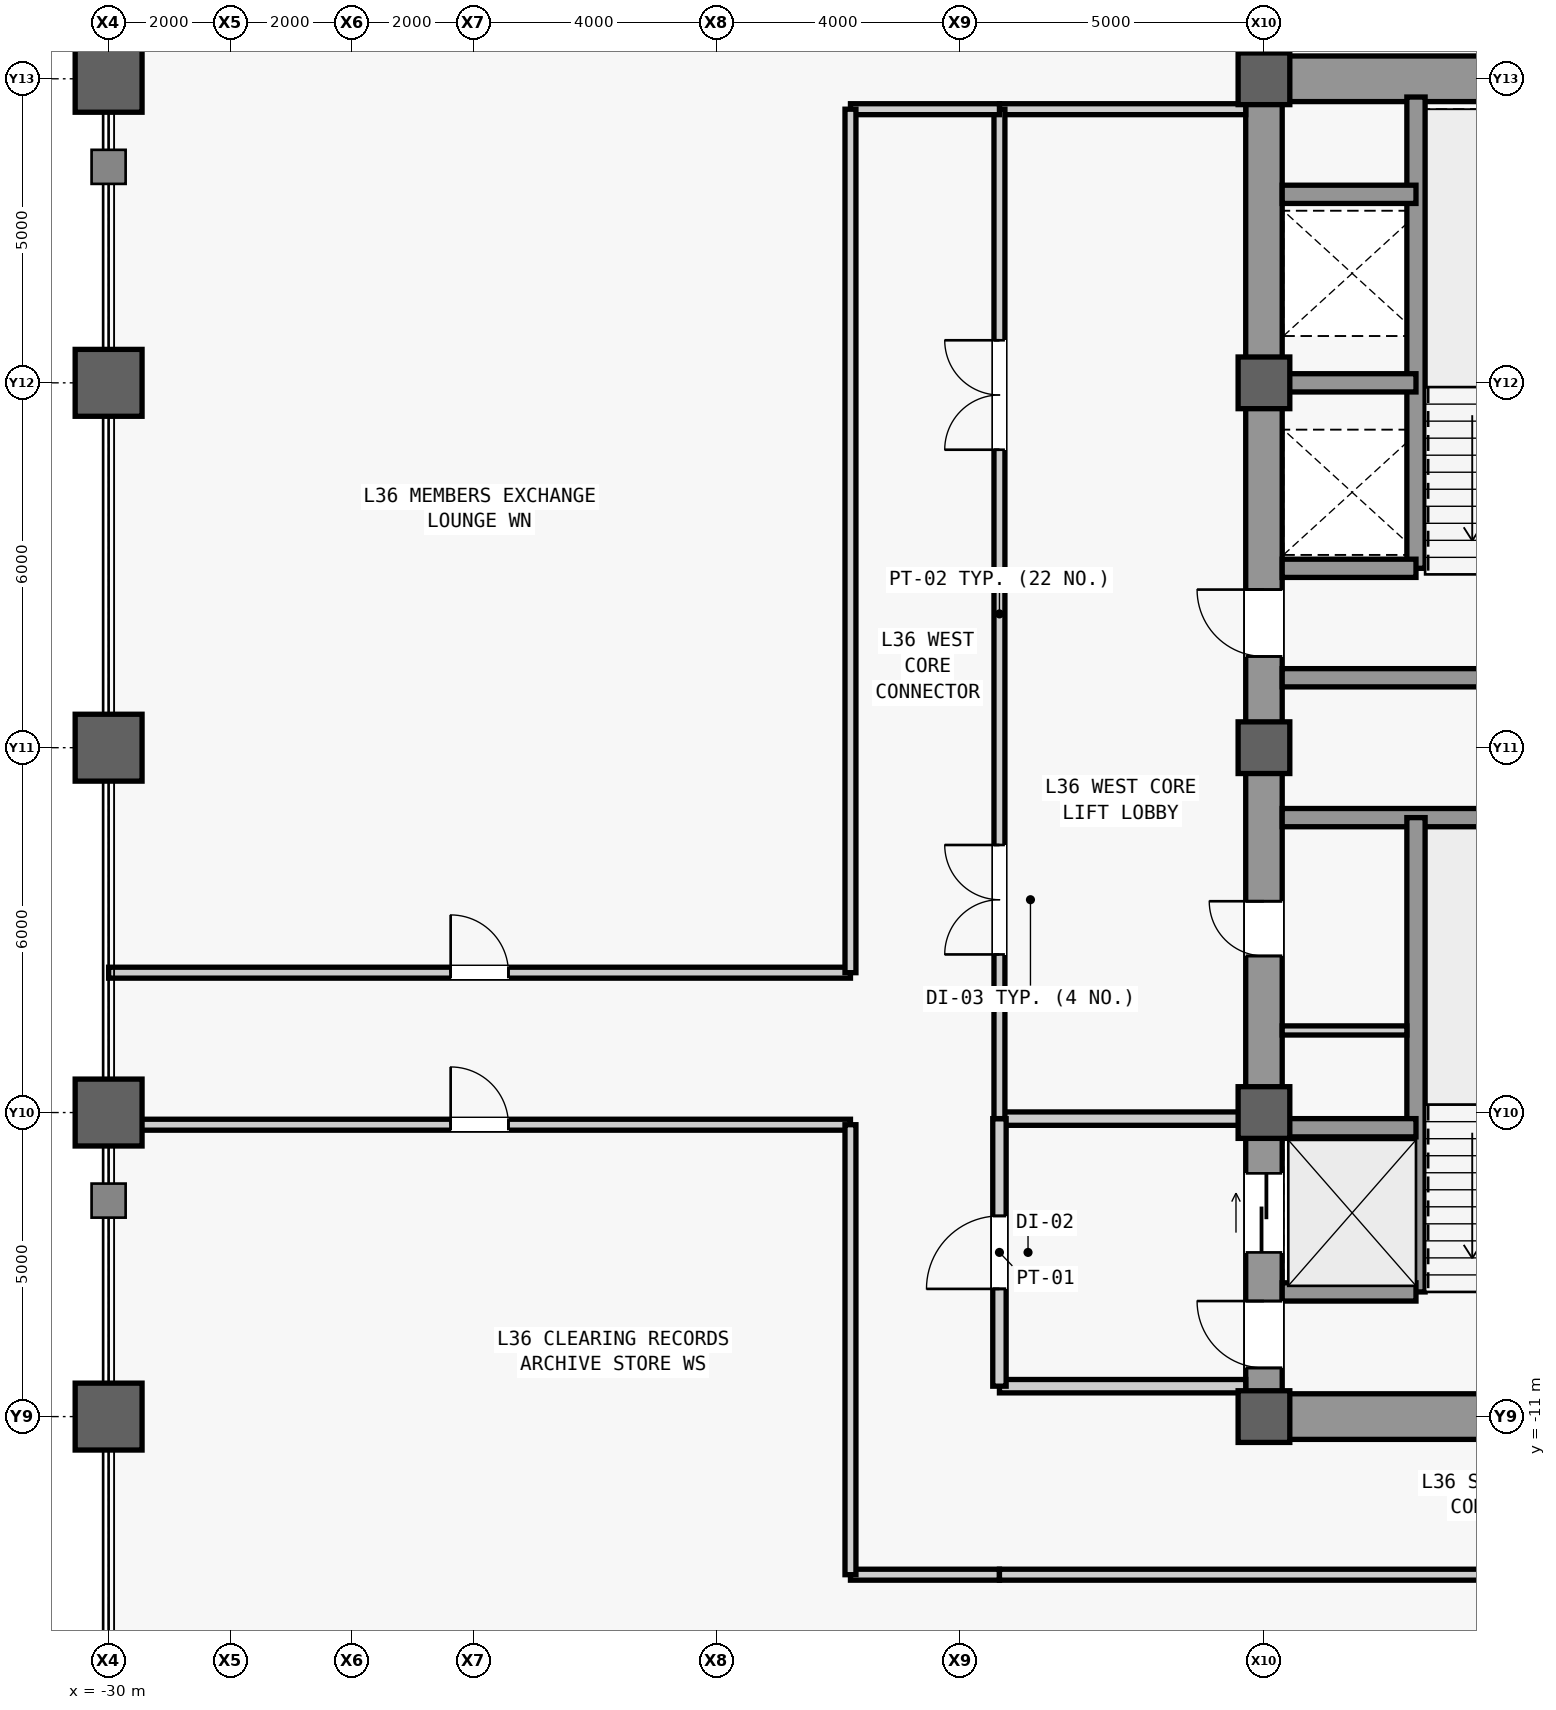
"""IFC4 building model, lengths in metres.
Left out: names, types, materials, properties, quantities, classifications, styles, units other than length and angle.
Written with IfcOpenShell. Run it as: python <this file> out.ifc"""

import sys

from ifc_helpers import new_model, si_unit, direction, frame, frame_2d, origin, origin_2d, place, context, subcontext, project, spatial, rectangle, hollow_rectangle, extrude, source, transform, mapped, element, fill, save


model = new_model("IFC4")
c1 = context("Model", 3, precision=1e-05, world=origin(), true_north=direction((0.0, 1.0)))
c2 = subcontext(c1, "Body", "Model", "MODEL_VIEW")
j1 = project(units=[si_unit("LENGTHUNIT", "METRE"), si_unit("PLANEANGLEUNIT", "RADIAN")], contexts=[c1])
p1 = place(None, origin())
s1 = spatial("IfcSite", under=j1, at=p1, CompositionType="ELEMENT")
p2 = place(p1, origin())
s2 = spatial("IfcBuilding", under=s1, at=p2, CompositionType="ELEMENT")
p3 = place(p2, frame((0.0, 0.0, 159.1)))
s3 = spatial("IfcBuildingStorey", under=s2, at=p3, CompositionType="ELEMENT", Elevation=159.1)
m1 = source(origin(), c2, "Body", "SweptSolid", [
    extrude(rectangle(XDim=22.0, YDim=0.6, at=frame_2d((11.0, 0.0))), origin(), (0.0, 0.0, 1.0), 3.78),
])
p4 = place(p3, frame((-11.0, -11.0, 0.0), z_axis=(0.0, 0.0, 1.0), x_axis=(0.0, 1.0, 0.0)))
e1 = element("IfcWall", 1, at=p4, inside=s3, PredefinedType="SHEAR", context=c2, shape_type="MappedRepresentation", body=[
    mapped(m1, transform((0.0, 0.0, 0.0), scale=1.0)),
])
m2 = source(origin(), c2, "Body", "SweptSolid", [
    extrude(rectangle(XDim=1.1, YDim=2.2, at=frame_2d((0.55, 1.1))), frame((0.0, 0.31, 0.0), z_axis=(0.0, -1.0, 0.0), x_axis=(1.0, 0.0, 0.0)), (0.0, 0.0, 1.0), 0.62),
])
p5 = place(p4, frame((0.8, 0.0, 0.0)))
e2 = element("IfcOpeningElement", 2, at=p5, cuts=e1, PredefinedType="OPENING", context=c2, shape_type="MappedRepresentation", body=[
    mapped(m2, transform((0.0, 0.0, 0.0), scale=1.0)),
])
p6 = place(p4, frame((12.5, 0.0, 0.0)))
e3 = element("IfcOpeningElement", 3, at=p6, cuts=e1, PredefinedType="OPENING", context=c2, shape_type="MappedRepresentation", body=[
    mapped(m2, transform((0.0, 0.0, 0.0), scale=1.0)),
])
m3 = source(origin(), c2, "Body", "SweptSolid", [
    extrude(rectangle(XDim=0.9, YDim=2.15, at=frame_2d((0.45, 1.075))), frame((0.0, 0.31, 0.0), z_axis=(0.0, -1.0, 0.0), x_axis=(1.0, 0.0, 0.0)), (0.0, 0.0, 1.0), 0.62),
])
p7 = place(p4, frame((7.575, 0.0, 0.0)))
e4 = element("IfcOpeningElement", 4, at=p7, cuts=e1, PredefinedType="OPENING", context=c2, shape_type="MappedRepresentation", body=[
    mapped(m3, transform((0.0, 0.0, 0.0), scale=1.0)),
])
m4 = source(origin(), c2, "Body", "SweptSolid", [
    extrude(rectangle(XDim=1.3, YDim=2.3, at=frame_2d((0.65, 1.15))), frame((0.0, 0.31, 0.0), z_axis=(0.0, -1.0, 0.0), x_axis=(1.0, 0.0, 0.0)), (0.0, 0.0, 1.0), 0.62),
])
p8 = place(p4, frame((2.7, 0.0, 0.0)))
e5 = element("IfcOpeningElement", 5, at=p8, cuts=e1, PredefinedType="OPENING", context=c2, shape_type="MappedRepresentation", body=[
    mapped(m4, transform((0.0, 0.0, 0.0), scale=1.0)),
])
m5 = source(origin(), c2, "Body", "SweptSolid", [
    extrude(rectangle(XDim=5.85, YDim=0.75, at=frame_2d((2.925, 0.0))), origin(), (0.0, 0.0, 1.0), 3.78),
])
for number, where, z_axis, x_axis in (
    (6, (-10.7, -11.0, 0.0), (0.0, 0.0, 1.0), (1.0, 0.0, 0.0)),
    (7, (-10.7, 11.0, 0.0), (0.0, 0.0, 1.0), (1.0, 0.0, 0.0)),
):
    element("IfcWall", number, at=place(p3, frame(where, z_axis=z_axis, x_axis=x_axis)), inside=s3, PredefinedType="SHEAR", context=c2, shape_type="MappedRepresentation", body=[
        mapped(m5, transform((0.0, 0.0, 0.0), scale=1.0)),
    ])
m6 = source(origin(), c2, "Body", "SweptSolid", [
    extrude(rectangle(XDim=5.6, YDim=0.3, at=frame_2d((2.8, 0.0))), origin(), (0.0, 0.0, 1.0), 3.78),
])
for number, where, z_axis, x_axis in (
    (8, (-10.7, -1.15, 0.0), (0.0, 0.0, 1.0), (1.0, 0.0, 0.0)),
    (9, (-10.7, 1.15, 0.0), (0.0, 0.0, 1.0), (1.0, 0.0, 0.0)),
):
    element("IfcWall", number, at=place(p3, frame(where, z_axis=z_axis, x_axis=x_axis)), inside=s3, PredefinedType="SHEAR", context=c2, shape_type="MappedRepresentation", body=[
        mapped(m6, transform((0.0, 0.0, 0.0), scale=1.0)),
    ])
m7 = source(origin(), c2, "Body", "SweptSolid", [
    extrude(hollow_rectangle(XDim=1.1, YDim=1.1, WallThickness=0.06, at=origin_2d()), origin(), (0.0, 0.0, 1.0), 4.0),
])
for number, where, z_axis, x_axis in (
    (10, (-30.0, -11.0, 0.0), (0.0, 0.0, 1.0), (1.0, 0.0, 0.0)),
    (11, (-30.0, -6.0, 0.0), (0.0, 0.0, 1.0), (1.0, 0.0, 0.0)),
    (12, (-30.0, 0.0, 0.0), (0.0, 0.0, 1.0), (1.0, 0.0, 0.0)),
    (13, (-30.0, 6.0, 0.0), (0.0, 0.0, 1.0), (1.0, 0.0, 0.0)),
    (14, (-30.0, 11.0, 0.0), (0.0, 0.0, 1.0), (1.0, 0.0, 0.0)),
):
    element("IfcColumn", number, at=place(p3, frame(where, z_axis=z_axis, x_axis=x_axis)), inside=s3, PredefinedType="COLUMN", context=c2, shape_type="MappedRepresentation", body=[
        mapped(m7, transform((0.0, 0.0, 0.0), scale=1.0)),
    ])
m8 = source(origin(), c2, "Body", "SweptSolid", [
    extrude(rectangle(XDim=0.85, YDim=0.85, at=origin_2d()), origin(), (0.0, 0.0, 1.0), 4.0),
])
for number, where, z_axis, x_axis in (
    (15, (-11.0, -11.0, 0.0), (0.0, 0.0, 1.0), (1.0, 0.0, 0.0)),
    (16, (-11.0, -6.0, 0.0), (0.0, 0.0, 1.0), (1.0, 0.0, 0.0)),
    (17, (-11.0, 0.0, 0.0), (0.0, 0.0, 1.0), (1.0, 0.0, 0.0)),
    (18, (-11.0, 6.0, 0.0), (0.0, 0.0, 1.0), (1.0, 0.0, 0.0)),
    (19, (-11.0, 11.0, 0.0), (0.0, 0.0, 1.0), (1.0, 0.0, 0.0)),
):
    element("IfcColumn", number, at=place(p3, frame(where, z_axis=z_axis, x_axis=x_axis)), inside=s3, PredefinedType="COLUMN", context=c2, shape_type="MappedRepresentation", body=[
        mapped(m8, transform((0.0, 0.0, 0.0), scale=1.0)),
    ])
m9 = source(origin(), c2, "Body", "SweptSolid", [
    extrude(rectangle(XDim=7.8, YDim=0.3, at=frame_2d((3.9, 0.0))), origin(), (0.0, 0.0, 1.0), 3.78),
])
p9 = place(p3, frame((-8.5, -8.95, 0.0), z_axis=(0.0, 0.0, 1.0), x_axis=(0.0, 1.0, 0.0)))
e20 = element("IfcWall", 20, at=p9, inside=s3, PredefinedType="SHEAR", context=c2, shape_type="MappedRepresentation", body=[
    mapped(m9, transform((0.0, 0.0, 0.0), scale=1.0)),
])
m10 = source(origin(), c2, "Body", "SweptSolid", [
    extrude(rectangle(XDim=2.2, YDim=0.3, at=frame_2d((1.1, 0.0))), origin(), (0.0, 0.0, 1.0), 3.78),
])
for number, where, z_axis, x_axis in (
    (21, (-10.7, -8.95, 0.0), (0.0, 0.0, 1.0), (1.0, 0.0, 0.0)),
    (22, (-10.7, -6.25, 0.0), (0.0, 0.0, 1.0), (1.0, 0.0, 0.0)),
):
    element("IfcWall", number, at=place(p3, frame(where, z_axis=z_axis, x_axis=x_axis)), inside=s3, PredefinedType="SHEAR", context=c2, shape_type="MappedRepresentation", body=[
        mapped(m10, transform((0.0, 0.0, 0.0), scale=1.0)),
    ])
m11 = source(origin(), c2, "Body", "SweptSolid", [
    extrude(rectangle(XDim=7.75, YDim=0.3, at=frame_2d((3.875, 0.0))), origin(), (0.0, 0.0, 1.0), 3.78),
])
p10 = place(p3, frame((-8.5, 2.95, 0.0), z_axis=(0.0, 0.0, 1.0), x_axis=(0.0, 1.0, 0.0)))
e23 = element("IfcWall", 23, at=p10, inside=s3, PredefinedType="SHEAR", context=c2, shape_type="MappedRepresentation", body=[
    mapped(m11, transform((0.0, 0.0, 0.0), scale=1.0)),
])
for number, where, z_axis, x_axis in (
    (24, (-10.7, 2.95, 0.0), (0.0, 0.0, 1.0), (1.0, 0.0, 0.0)),
    (25, (-10.7, 6.0, 0.0), (0.0, 0.0, 1.0), (1.0, 0.0, 0.0)),
    (26, (-10.7, 9.1, 0.0), (0.0, 0.0, 1.0), (1.0, 0.0, 0.0)),
):
    element("IfcWall", number, at=place(p3, frame(where, z_axis=z_axis, x_axis=x_axis)), inside=s3, PredefinedType="SHEAR", context=c2, shape_type="MappedRepresentation", body=[
        mapped(m10, transform((0.0, 0.0, 0.0), scale=1.0)),
    ])
m12 = source(origin(), c2, "Body", "SweptSolid", [
    extrude(rectangle(XDim=2.05, YDim=0.15, at=frame_2d((1.025, 0.0))), origin(), (0.0, 0.0, 1.0), 3.78),
])
p11 = place(p3, frame((-10.7, -4.65, 0.0), z_axis=(0.0, 0.0, 1.0), x_axis=(1.0, 0.0, 0.0)))
e27 = element("IfcWall", 27, at=p11, inside=s3, PredefinedType="PARTITIONING", context=c2, shape_type="MappedRepresentation", body=[
    mapped(m12, transform((0.0, 0.0, 0.0), scale=1.0)),
])
m13 = source(origin(), c2, "Body", "SweptSolid", [
    extrude(rectangle(XDim=4.05, YDim=0.22, at=frame_2d((2.025, 0.0))), origin(), (0.0, 0.0, 1.0), 3.78),
])
p12 = place(p3, frame((-15.35, -10.5, 0.0), z_axis=(0.0, 0.0, 1.0), x_axis=(1.0, 0.0, 0.0)))
e28 = element("IfcWall", 28, at=p12, inside=s3, PredefinedType="PARTITIONING", context=c2, shape_type="MappedRepresentation", body=[
    mapped(m13, transform((0.0, 0.0, 0.0), scale=1.0)),
])
m14 = source(origin(), c2, "Body", "SweptSolid", [
    extrude(rectangle(XDim=4.05, YDim=0.22, at=frame_2d((2.025, 0.0))), origin(), (0.0, 0.0, 1.0), 3.007),
])
p13 = place(p3, frame((-15.35, -6.1, 0.0), z_axis=(0.0, 0.0, 1.0), x_axis=(1.0, 0.0, 0.0)))
e29 = element("IfcWall", 29, at=p13, inside=s3, PredefinedType="PARTITIONING", context=c2, shape_type="MappedRepresentation", body=[
    mapped(m14, transform((0.0, 0.0, 0.0), scale=1.0)),
])
m15 = source(origin(), c2, "Body", "SweptSolid", [
    extrude(rectangle(XDim=4.4, YDim=0.22, at=frame_2d((2.2, 0.0))), origin(), (0.0, 0.0, 1.0), 3.78),
])
p14 = place(p3, frame((-15.35, -10.5, 0.0), z_axis=(0.0, 0.0, 1.0), x_axis=(0.0, 1.0, 0.0)))
e30 = element("IfcWall", 30, at=p14, inside=s3, PredefinedType="PARTITIONING", context=c2, shape_type="MappedRepresentation", body=[
    mapped(m15, transform((0.0, 0.0, 0.0), scale=1.0)),
])
m16 = source(origin(), c2, "Body", "SweptSolid", [
    extrude(rectangle(XDim=1.2, YDim=2.2, at=frame_2d((0.6, 1.1))), frame((0.0, 0.12, 0.0), z_axis=(0.0, -1.0, 0.0), x_axis=(1.0, 0.0, 0.0)), (0.0, 0.0, 1.0), 0.24),
])
p15 = place(p14, frame((1.6, 0.0, 0.0)))
e31 = element("IfcOpeningElement", 31, at=p15, cuts=e30, PredefinedType="OPENING", context=c2, shape_type="MappedRepresentation", body=[
    mapped(m16, transform((0.0, 0.0, 0.0), scale=1.0)),
])
m17 = source(origin(), c2, "Body", "SweptSolid", [
    extrude(rectangle(XDim=4.05, YDim=0.18, at=frame_2d((2.025, 0.0))), origin(), (0.0, 0.0, 1.0), 3.78),
])
p16 = place(p3, frame((-15.35, 10.5, 0.0), z_axis=(0.0, 0.0, 1.0), x_axis=(1.0, 0.0, 0.0)))
e32 = element("IfcWall", 32, at=p16, inside=s3, PredefinedType="PARTITIONING", context=c2, shape_type="MappedRepresentation", body=[
    mapped(m17, transform((0.0, 0.0, 0.0), scale=1.0)),
])
m18 = source(origin(), c2, "Body", "SweptSolid", [
    extrude(rectangle(XDim=16.6, YDim=0.18, at=frame_2d((8.3, 0.0))), origin(), (0.0, 0.0, 1.0), 3.78),
])
p17 = place(p3, frame((-15.35, -6.1, 0.0), z_axis=(0.0, 0.0, 1.0), x_axis=(0.0, 1.0, 0.0)))
e33 = element("IfcWall", 33, at=p17, inside=s3, PredefinedType="PARTITIONING", context=c2, shape_type="MappedRepresentation", body=[
    mapped(m18, transform((0.0, 0.0, 0.0), scale=1.0)),
])
m19 = source(origin(), c2, "Body", "SweptSolid", [
    extrude(rectangle(XDim=1.8, YDim=2.25, at=frame_2d((0.9, 1.125))), frame((0.0, 0.1, 0.0), z_axis=(0.0, -1.0, 0.0), x_axis=(1.0, 0.0, 0.0)), (0.0, 0.0, 1.0), 0.2),
])
p18 = place(p17, frame((2.7, 0.0, 0.0)))
e34 = element("IfcOpeningElement", 34, at=p18, cuts=e33, PredefinedType="OPENING", context=c2, shape_type="MappedRepresentation", body=[
    mapped(m19, transform((0.0, 0.0, 0.0), scale=1.0)),
])
p19 = place(p17, frame((11.0, 0.0, 0.0)))
e35 = element("IfcOpeningElement", 35, at=p19, cuts=e33, PredefinedType="OPENING", context=c2, shape_type="MappedRepresentation", body=[
    mapped(m19, transform((0.0, 0.0, 0.0), scale=1.0)),
])
m20 = source(origin(), c2, "Body", "SweptSolid", [
    extrude(rectangle(XDim=2.45, YDim=0.18, at=frame_2d((1.225, 0.0))), origin(), (0.0, 0.0, 1.0), 3.78),
])
for number, where, z_axis, x_axis in (
    (36, (-17.8, 10.5, 0.0), (0.0, 0.0, 1.0), (1.0, 0.0, 0.0)),
    (37, (-17.8, -13.6, 0.0), (0.0, 0.0, 1.0), (1.0, 0.0, 0.0)),
):
    element("IfcWall", number, at=place(p3, frame(where, z_axis=z_axis, x_axis=x_axis)), inside=s3, PredefinedType="PARTITIONING", context=c2, shape_type="MappedRepresentation", body=[
        mapped(m20, transform((0.0, 0.0, 0.0), scale=1.0)),
    ])
m21 = source(origin(), c2, "Body", "SweptSolid", [
    extrude(rectangle(XDim=9.55, YDim=0.18, at=frame_2d((4.775, 0.0))), origin(), (0.0, 0.0, 1.0), 3.78),
])
p20 = place(p3, frame((-15.35, -13.6, 0.0), z_axis=(0.0, 0.0, 1.0), x_axis=(1.0, 0.0, 0.0)))
e38 = element("IfcWall", 38, at=p20, inside=s3, PredefinedType="PARTITIONING", context=c2, shape_type="MappedRepresentation", body=[
    mapped(m21, transform((0.0, 0.0, 0.0), scale=1.0)),
])
m22 = source(origin(), c2, "Body", "SweptSolid", [
    extrude(rectangle(XDim=12.2, YDim=0.18, at=frame_2d((6.1, 0.0))), origin(), (0.0, 0.0, 1.0), 3.007),
])
p21 = place(p3, frame((-30.0, -6.2, 0.0), z_axis=(0.0, 0.0, 1.0), x_axis=(1.0, 0.0, 0.0)))
e39 = element("IfcWall", 39, at=p21, inside=s3, PredefinedType="PARTITIONING", context=c2, shape_type="MappedRepresentation", body=[
    mapped(m22, transform((0.0, 0.0, 0.0), scale=1.0)),
])
m23 = source(origin(), c2, "Body", "SweptSolid", [
    extrude(rectangle(XDim=0.95, YDim=2.15, at=frame_2d((0.475, 1.075))), frame((0.0, 0.1, 0.0), z_axis=(0.0, -1.0, 0.0), x_axis=(1.0, 0.0, 0.0)), (0.0, 0.0, 1.0), 0.2),
])
p22 = place(p21, frame((5.625, 0.0, 0.0)))
e40 = element("IfcOpeningElement", 40, at=p22, cuts=e39, PredefinedType="OPENING", context=c2, shape_type="MappedRepresentation", body=[
    mapped(m23, transform((0.0, 0.0, 0.0), scale=1.0)),
])
m24 = source(origin(), c2, "Body", "SweptSolid", [
    extrude(rectangle(XDim=7.4, YDim=0.18, at=frame_2d((3.7, 0.0))), origin(), (0.0, 0.0, 1.0), 3.78),
])
p23 = place(p3, frame((-17.8, -13.6, 0.0), z_axis=(0.0, 0.0, 1.0), x_axis=(0.0, 1.0, 0.0)))
e41 = element("IfcWall", 41, at=p23, inside=s3, PredefinedType="PARTITIONING", context=c2, shape_type="MappedRepresentation", body=[
    mapped(m24, transform((0.0, 0.0, 0.0), scale=1.0)),
])
m25 = source(origin(), c2, "Body", "SweptSolid", [
    extrude(rectangle(XDim=12.2, YDim=0.18, at=frame_2d((6.1, 0.0))), origin(), (0.0, 0.0, 1.0), 3.78),
])
p24 = place(p3, frame((-30.0, -3.7, 0.0), z_axis=(0.0, 0.0, 1.0), x_axis=(1.0, 0.0, 0.0)))
e42 = element("IfcWall", 42, at=p24, inside=s3, PredefinedType="PARTITIONING", context=c2, shape_type="MappedRepresentation", body=[
    mapped(m25, transform((0.0, 0.0, 0.0), scale=1.0)),
])
p25 = place(p24, frame((5.625, 0.0, 0.0)))
e43 = element("IfcOpeningElement", 43, at=p25, cuts=e42, PredefinedType="OPENING", context=c2, shape_type="MappedRepresentation", body=[
    mapped(m23, transform((0.0, 0.0, 0.0), scale=1.0)),
])
m26 = source(origin(), c2, "Body", "SweptSolid", [
    extrude(rectangle(XDim=14.2, YDim=0.18, at=frame_2d((7.1, 0.0))), origin(), (0.0, 0.0, 1.0), 3.78),
])
p26 = place(p3, frame((-17.8, -3.7, 0.0), z_axis=(0.0, 0.0, 1.0), x_axis=(0.0, 1.0, 0.0)))
e44 = element("IfcWall", 44, at=p26, inside=s3, PredefinedType="PARTITIONING", context=c2, shape_type="MappedRepresentation", body=[
    mapped(m26, transform((0.0, 0.0, 0.0), scale=1.0)),
])
m27 = source(origin(), c2, "Body", "SweptSolid", [
    extrude(rectangle(XDim=1.1, YDim=2.2, at=frame_2d((0.55, 1.1))), frame((0.0, 0.025, 0.0), z_axis=(0.0, -1.0, 0.0), x_axis=(1.0, 0.0, 0.0)), (0.0, 0.0, 1.0), 0.05),
])
p27 = place(p5, origin())
e45 = element("IfcDoor", 45, at=p27, inside=s3, OperationType="SINGLE_SWING_RIGHT", PredefinedType="DOOR", context=c2, shape_type="MappedRepresentation", body=[
    mapped(m27, transform((0.0, 0.0, 0.0), scale=1.0)),
])
fill(e2, e45)
p28 = place(p6, origin())
e46 = element("IfcDoor", 46, at=p28, inside=s3, OperationType="SINGLE_SWING_RIGHT", PredefinedType="DOOR", context=c2, shape_type="MappedRepresentation", body=[
    mapped(m27, transform((0.0, 0.0, 0.0), scale=1.0)),
])
fill(e3, e46)
m28 = source(origin(), c2, "Body", "SweptSolid", [
    extrude(rectangle(XDim=0.9, YDim=2.15, at=frame_2d((0.45, 1.075))), frame((0.0, 0.025, 0.0), z_axis=(0.0, -1.0, 0.0), x_axis=(1.0, 0.0, 0.0)), (0.0, 0.0, 1.0), 0.05),
])
p29 = place(p7, origin())
e47 = element("IfcDoor", 47, at=p29, inside=s3, OperationType="SINGLE_SWING_RIGHT", PredefinedType="DOOR", context=c2, shape_type="MappedRepresentation", body=[
    mapped(m28, transform((0.0, 0.0, 0.0), scale=1.0)),
])
fill(e4, e47)
m29 = source(origin(), c2, "Body", "SweptSolid", [
    extrude(rectangle(XDim=1.2, YDim=2.2, at=frame_2d((0.6, 1.1))), frame((0.0, 0.025, 0.0), z_axis=(0.0, -1.0, 0.0), x_axis=(1.0, 0.0, 0.0)), (0.0, 0.0, 1.0), 0.05),
])
p30 = place(p15, origin())
e48 = element("IfcDoor", 48, at=p30, inside=s3, OperationType="SINGLE_SWING_LEFT", PredefinedType="DOOR", context=c2, shape_type="MappedRepresentation", body=[
    mapped(m29, transform((0.0, 0.0, 0.0), scale=1.0)),
])
fill(e31, e48)
m30 = source(origin(), c2, "Body", "SweptSolid", [
    extrude(rectangle(XDim=1.8, YDim=2.25, at=frame_2d((0.9, 1.125))), frame((0.0, 0.025, 0.0), z_axis=(0.0, -1.0, 0.0), x_axis=(1.0, 0.0, 0.0)), (0.0, 0.0, 1.0), 0.05),
])
p31 = place(p18, origin())
e49 = element("IfcDoor", 49, at=p31, inside=s3, OperationType="SINGLE_SWING_LEFT", PredefinedType="DOOR", context=c2, shape_type="MappedRepresentation", body=[
    mapped(m30, transform((0.0, 0.0, 0.0), scale=1.0)),
])
fill(e34, e49)
p32 = place(p19, origin())
e50 = element("IfcDoor", 50, at=p32, inside=s3, OperationType="SINGLE_SWING_RIGHT", PredefinedType="DOOR", context=c2, shape_type="MappedRepresentation", body=[
    mapped(m30, transform((0.0, 0.0, 0.0), scale=1.0)),
])
fill(e35, e50)
m31 = source(origin(), c2, "Body", "SweptSolid", [
    extrude(rectangle(XDim=0.95, YDim=2.15, at=frame_2d((0.475, 1.075))), frame((0.0, 0.025, 0.0), z_axis=(0.0, -1.0, 0.0), x_axis=(1.0, 0.0, 0.0)), (0.0, 0.0, 1.0), 0.05),
])
p33 = place(p22, origin())
e51 = element("IfcDoor", 51, at=p33, inside=s3, OperationType="SINGLE_SWING_LEFT", PredefinedType="DOOR", context=c2, shape_type="MappedRepresentation", body=[
    mapped(m31, transform((0.0, 0.0, 0.0), scale=1.0)),
])
fill(e40, e51)
p34 = place(p25, origin())
e52 = element("IfcDoor", 52, at=p34, inside=s3, OperationType="SINGLE_SWING_LEFT", PredefinedType="DOOR", context=c2, shape_type="MappedRepresentation", body=[
    mapped(m31, transform((0.0, 0.0, 0.0), scale=1.0)),
])
fill(e43, e52)
m32 = source(origin(), c2, "Body", "SweptSolid", [
    extrude(rectangle(XDim=1.3, YDim=2.3, at=frame_2d((0.65, 1.15))), frame((0.0, 0.025, 0.0), z_axis=(0.0, -1.0, 0.0), x_axis=(1.0, 0.0, 0.0)), (0.0, 0.0, 1.0), 0.05),
])
p35 = place(p8, origin())
e53 = element("IfcDoor", 53, at=p35, inside=s3, OperationType="SLIDING_TO_LEFT", PredefinedType="DOOR", context=c2, shape_type="MappedRepresentation", body=[
    mapped(m32, transform((0.0, 0.0, 0.0), scale=1.0)),
])
fill(e5, e53)
save(model, sys.argv[1])
